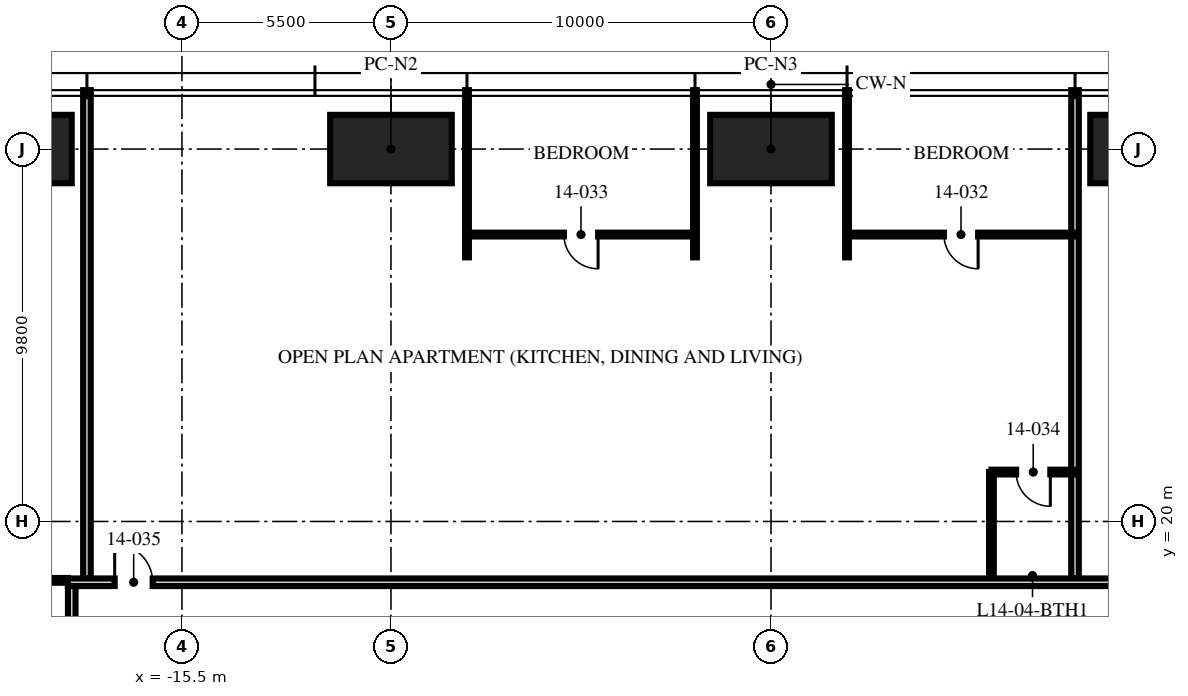
"""IFC4 building model, lengths in metres.
Left out: names, types, materials, properties, quantities, classifications, styles, units other than length and angle.
Written with IfcOpenShell. Run it as: python <this file> out.ifc"""

import sys

from ifc_helpers import new_model, si_unit, direction, frame, frame_2d, origin, origin_2d, place, context, subcontext, project, spatial, rectangle, hollow_rectangle, extrude, element, fill, save


model = new_model("IFC4")
c1 = context("Model", 3, precision=1e-05, world=origin(), true_north=direction((0.0, 1.0)))
c2 = subcontext(c1, "Body", "Model", "MODEL_VIEW")
j1 = project(units=[si_unit("LENGTHUNIT", "METRE"), si_unit("PLANEANGLEUNIT", "RADIAN")], contexts=[c1])
p1 = place(None, origin())
s1 = spatial("IfcSite", under=j1, at=p1, CompositionType="ELEMENT")
p2 = place(p1, origin())
s2 = spatial("IfcBuilding", under=s1, at=p2, CompositionType="ELEMENT")
p3 = place(p2, frame((0.0, 0.0, 58.5)))
s3 = spatial("IfcBuildingStorey", under=s2, at=p3, CompositionType="ELEMENT", Elevation=58.5)
for number, where, z_axis, x_axis in (
    (1, (-20.0, 29.8, 0.0), (0.0, 0.0, 1.0), (1.0, 0.0, 0.0)),
    (2, (-10.0, 29.8, 0.0), (0.0, 0.0, 1.0), (1.0, 0.0, 0.0)),
    (3, (0.0, 29.8, 0.0), (0.0, 0.0, 1.0), (1.0, 0.0, 0.0)),
    (4, (10.0, 29.8, 0.0), (0.0, 0.0, 1.0), (1.0, 0.0, 0.0)),
):
    element("IfcColumn", number, at=place(p3, frame(where, z_axis=z_axis, x_axis=x_axis)), inside=s3, PredefinedType="COLUMN", context=c2, shape_type="SweptSolid", body=[
        extrude(hollow_rectangle(XDim=3.2, YDim=1.8, WallThickness=0.2, at=origin_2d()), origin(), (0.0, 0.0, 1.0), 3.75),
    ])
p4 = place(p3, frame((8.0, 18.5, 0.0), z_axis=(0.0, 0.0, 1.0), x_axis=(0.0, 1.0, 0.0)))
e5 = element("IfcWall", 5, at=p4, inside=s3, PredefinedType="PARTITIONING", context=c2, shape_type="SweptSolid", body=[
    extrude(rectangle(XDim=12.85, YDim=0.2, at=frame_2d((6.425, 0.0))), origin(), (0.0, 0.0, 1.0), 2.71),
])
for number, where, z_axis, x_axis in (
    (6, (2.0, 26.95, 0.0), (0.0, 0.0, 1.0), (0.0, 1.0, 0.0)),
    (7, (-2.0, 26.95, 0.0), (0.0, 0.0, 1.0), (0.0, 1.0, 0.0)),
    (8, (-8.0, 26.95, 0.0), (0.0, 0.0, 1.0), (0.0, 1.0, 0.0)),
):
    element("IfcWall", number, at=place(p3, frame(where, z_axis=z_axis, x_axis=x_axis)), inside=s3, PredefinedType="PARTITIONING", context=c2, shape_type="SweptSolid", body=[
        extrude(rectangle(XDim=4.4, YDim=0.1, at=frame_2d((2.2, 0.0))), origin(), (0.0, 0.0, 1.0), 2.71),
    ])
p5 = place(p3, frame((-18.0, 18.5, 0.0), z_axis=(0.0, 0.0, 1.0), x_axis=(0.0, 1.0, 0.0)))
e9 = element("IfcWall", 9, at=p5, inside=s3, PredefinedType="PARTITIONING", context=c2, shape_type="SweptSolid", body=[
    extrude(rectangle(XDim=12.85, YDim=0.2, at=frame_2d((6.425, 0.0))), origin(), (0.0, 0.0, 1.0), 2.3),
])
p6 = place(p3, frame((8.0, 27.55, 0.0), z_axis=(0.0, 0.0, 1.0), x_axis=(-1.0, 0.0, 0.0)))
e10 = element("IfcWall", 10, at=p6, inside=s3, PredefinedType="PARTITIONING", context=c2, shape_type="SweptSolid", body=[
    extrude(rectangle(XDim=6.0, YDim=0.1, at=frame_2d((3.0, 0.0))), origin(), (0.0, 0.0, 1.0), 2.61),
])
p7 = place(p6, frame((2.55, 0.0, 0.0)))
e11 = element("IfcOpeningElement", 11, at=p7, cuts=e10, PredefinedType="OPENING", context=c2, shape_type="SweptSolid", body=[
    extrude(rectangle(XDim=0.9, YDim=2.1, at=frame_2d((0.45, 1.05))), frame((0.0, 0.06, 0.0), z_axis=(0.0, -1.0, 0.0), x_axis=(1.0, 0.0, 0.0)), (0.0, 0.0, 1.0), 0.12),
])
p8 = place(p3, frame((-2.0, 27.55, 0.0), z_axis=(0.0, 0.0, 1.0), x_axis=(-1.0, 0.0, 0.0)))
e12 = element("IfcWall", 12, at=p8, inside=s3, PredefinedType="PARTITIONING", context=c2, shape_type="SweptSolid", body=[
    extrude(rectangle(XDim=6.0, YDim=0.1, at=frame_2d((3.0, 0.0))), origin(), (0.0, 0.0, 1.0), 2.61),
])
p9 = place(p8, frame((2.55, 0.0, 0.0)))
e13 = element("IfcOpeningElement", 13, at=p9, cuts=e12, PredefinedType="OPENING", context=c2, shape_type="SweptSolid", body=[
    extrude(rectangle(XDim=0.9, YDim=2.1, at=frame_2d((0.45, 1.05))), frame((0.0, 0.06, 0.0), z_axis=(0.0, -1.0, 0.0), x_axis=(1.0, 0.0, 0.0)), (0.0, 0.0, 1.0), 0.12),
])
p10 = place(p3, frame((8.0, 21.3, 0.0), z_axis=(0.0, 0.0, 1.0), x_axis=(-1.0, 0.0, 0.0)))
e14 = element("IfcWall", 14, at=p10, inside=s3, PredefinedType="PARTITIONING", context=c2, shape_type="SweptSolid", body=[
    extrude(rectangle(XDim=2.2, YDim=0.125, at=frame_2d((1.1, 0.0))), origin(), (0.0, 0.0, 1.0), 3.5),
])
p11 = place(p10, frame((0.65, 0.0, 0.0)))
e15 = element("IfcOpeningElement", 15, at=p11, cuts=e14, PredefinedType="OPENING", context=c2, shape_type="SweptSolid", body=[
    extrude(rectangle(XDim=0.9, YDim=2.1, at=frame_2d((0.45, 1.05))), frame((0.0, 0.073, 0.0), z_axis=(0.0, -1.0, 0.0), x_axis=(1.0, 0.0, 0.0)), (0.0, 0.0, 1.0), 0.145),
])
p12 = place(p3, frame((5.8, 18.5, 0.0), z_axis=(0.0, 0.0, 1.0), x_axis=(0.0, 1.0, 0.0)))
e16 = element("IfcWall", 16, at=p12, inside=s3, PredefinedType="PARTITIONING", context=c2, shape_type="SweptSolid", body=[
    extrude(rectangle(XDim=2.8, YDim=0.125, at=frame_2d((1.4, 0.0))), origin(), (0.0, 0.0, 1.0), 3.5),
])
p13 = place(p3, frame((-18.5, 18.45, 0.0), z_axis=(0.0, 0.0, 1.0), x_axis=(-1.0, 0.0, 0.0)))
e17 = element("IfcWall", 17, at=p13, inside=s3, PredefinedType="PARTITIONING", context=c2, shape_type="SweptSolid", body=[
    extrude(rectangle(XDim=2.8, YDim=0.125, at=frame_2d((1.4, 0.0))), origin(), (0.0, 0.0, 1.0), 2.3),
])
p14 = place(p3, frame((-18.5, 18.4, 0.0), z_axis=(0.0, 0.0, 1.0), x_axis=(1.0, 0.0, 0.0)))
e18 = element("IfcWall", 18, at=p14, inside=s3, PredefinedType="PARTITIONING", context=c2, shape_type="SweptSolid", body=[
    extrude(rectangle(XDim=37.0, YDim=0.2, at=frame_2d((18.5, 0.0))), origin(), (0.0, 0.0, 1.0), 2.3),
])
p15 = place(p14, frame((1.23, 0.0, 0.0)))
e19 = element("IfcOpeningElement", 19, at=p15, cuts=e18, PredefinedType="OPENING", context=c2, shape_type="SweptSolid", body=[
    extrude(rectangle(XDim=1.0, YDim=2.2, at=frame_2d((0.5, 1.1))), frame((0.0, 0.11, 0.0), z_axis=(0.0, -1.0, 0.0), x_axis=(1.0, 0.0, 0.0)), (0.0, 0.0, 1.0), 0.22),
])
p16 = place(p3, frame((-18.4, 18.3, 0.0), z_axis=(0.0, 0.0, 1.0), x_axis=(0.0, -1.0, 0.0)))
e20 = element("IfcWall", 20, at=p16, inside=s3, PredefinedType="PARTITIONING", context=c2, shape_type="SweptSolid", body=[
    extrude(rectangle(XDim=8.3, YDim=0.2, at=frame_2d((4.15, 0.0))), origin(), (0.0, 0.0, 1.0), 2.3),
])
p17 = place(p7, origin())
e21 = element("IfcDoor", 21, at=p17, inside=s3, OperationType="SINGLE_SWING_LEFT", PredefinedType="DOOR", context=c2, shape_type="SweptSolid", body=[
    extrude(rectangle(XDim=0.9, YDim=2.1, at=frame_2d((0.45, 1.05))), frame((0.0, 0.025, 0.0), z_axis=(0.0, -1.0, 0.0), x_axis=(1.0, 0.0, 0.0)), (0.0, 0.0, 1.0), 0.05),
])
fill(e11, e21)
p18 = place(p9, origin())
e22 = element("IfcDoor", 22, at=p18, inside=s3, OperationType="SINGLE_SWING_LEFT", PredefinedType="DOOR", context=c2, shape_type="SweptSolid", body=[
    extrude(rectangle(XDim=0.9, YDim=2.1, at=frame_2d((0.45, 1.05))), frame((0.0, 0.025, 0.0), z_axis=(0.0, -1.0, 0.0), x_axis=(1.0, 0.0, 0.0)), (0.0, 0.0, 1.0), 0.05),
])
fill(e13, e22)
p19 = place(p11, origin())
e23 = element("IfcDoor", 23, at=p19, inside=s3, OperationType="SINGLE_SWING_LEFT", PredefinedType="DOOR", context=c2, shape_type="SweptSolid", body=[
    extrude(rectangle(XDim=0.9, YDim=2.1, at=frame_2d((0.45, 1.05))), frame((0.0, 0.025, 0.0), z_axis=(0.0, -1.0, 0.0), x_axis=(1.0, 0.0, 0.0)), (0.0, 0.0, 1.0), 0.05),
])
fill(e15, e23)
p20 = place(p15, origin())
e24 = element("IfcDoor", 24, at=p20, inside=s3, OperationType="SINGLE_SWING_LEFT", PredefinedType="DOOR", context=c2, shape_type="SweptSolid", body=[
    extrude(rectangle(XDim=1.0, YDim=2.2, at=frame_2d((0.5, 1.1))), frame((0.0, 0.025, 0.0), z_axis=(0.0, -1.0, 0.0), x_axis=(1.0, 0.0, 0.0)), (0.0, 0.0, 1.0), 0.05),
])
fill(e19, e24)
save(model, sys.argv[1])
